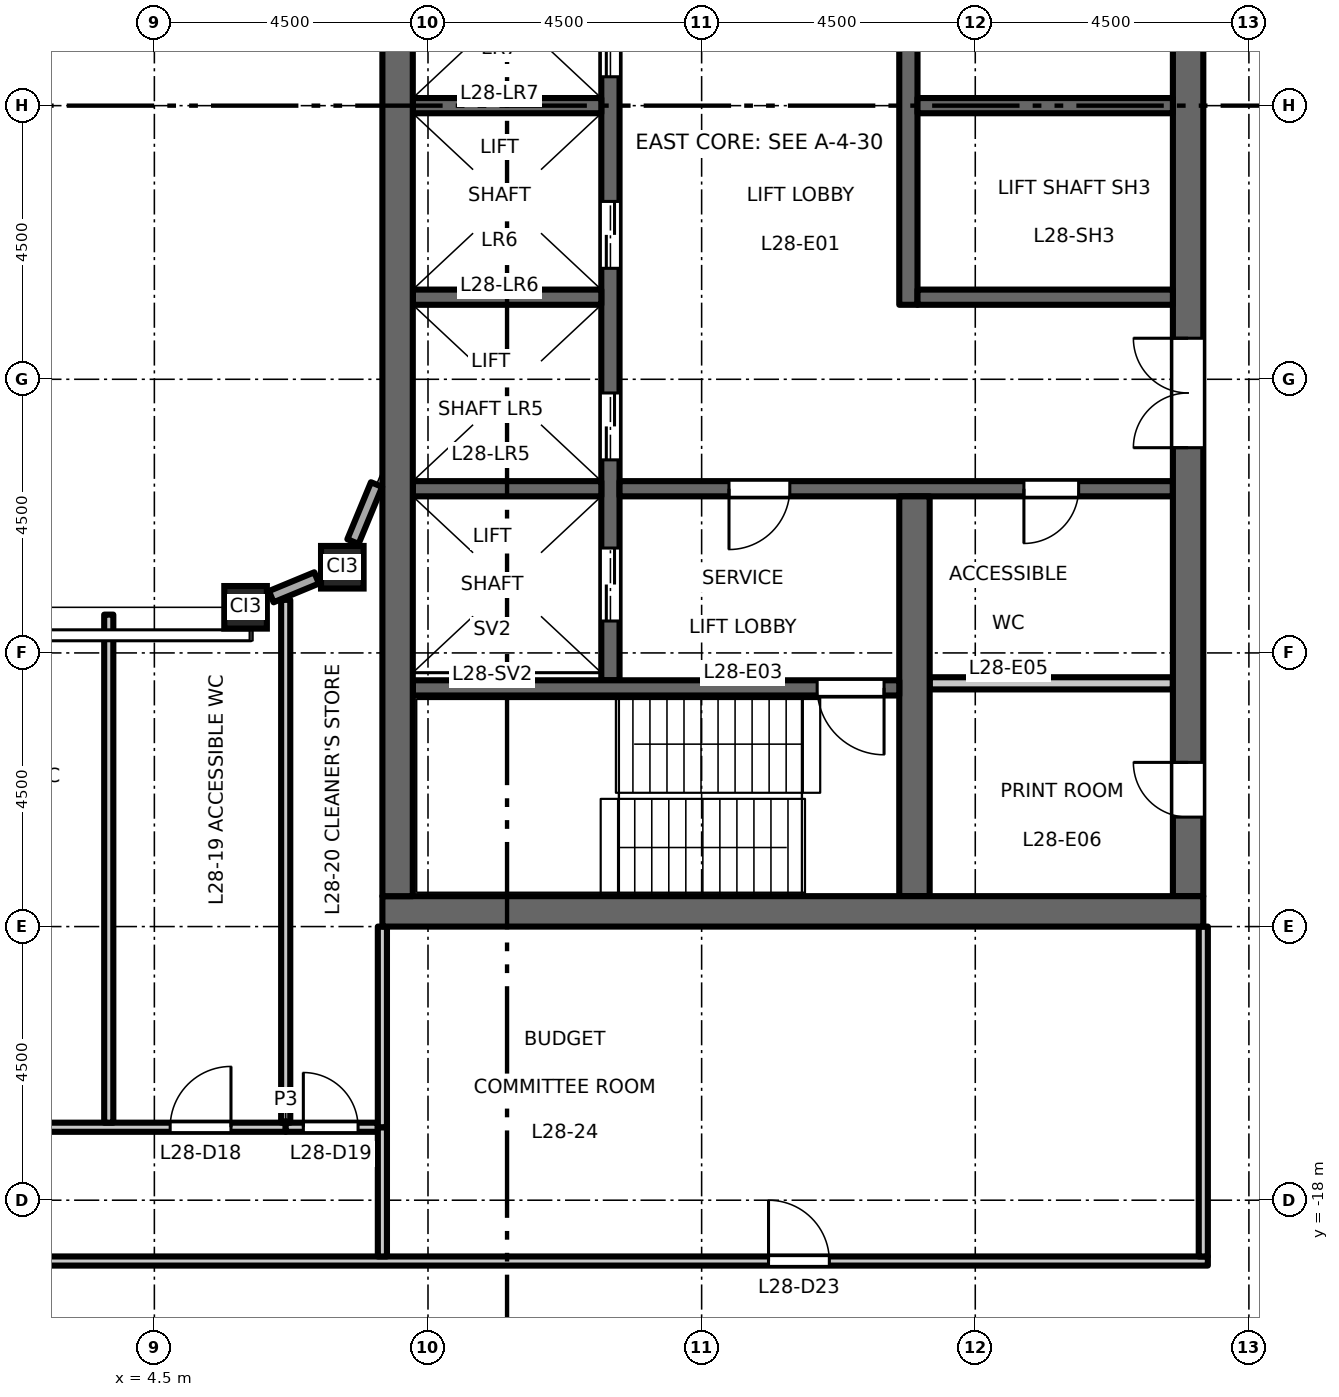
"""IFC4 building model, lengths in metres.
Left out: names, types, materials, properties, quantities, classifications, styles, units other than length and angle.
Written with IfcOpenShell. Run it as: python <this file> out.ifc"""

import sys

from ifc_helpers import new_model, si_unit, direction, frame, frame_2d, origin, origin_2d, place, context, subcontext, project, spatial, rectangle, hollow_rectangle, extrude, element, fill, save


model = new_model("IFC4")
c1 = context("Model", 3, precision=1e-05, world=origin(), true_north=direction((0.0, 1.0)))
c2 = subcontext(c1, "Body", "Model", "MODEL_VIEW")
j1 = project(units=[si_unit("LENGTHUNIT", "METRE"), si_unit("PLANEANGLEUNIT", "RADIAN")], contexts=[c1])
p1 = place(None, origin())
s1 = spatial("IfcSite", under=j1, at=p1, CompositionType="ELEMENT")
p2 = place(p1, origin())
s2 = spatial("IfcBuilding", under=s1, at=p2, CompositionType="ELEMENT")
p3 = place(p2, frame((0.0, 0.0, 131.7)))
s3 = spatial("IfcBuildingStorey", under=s2, at=p3, CompositionType="ELEMENT", Elevation=131.7)
for number, where, z_axis, x_axis in (
    (1, (6.0, -8.25, 0.0), (0.0, 0.0, 1.0), (1.0, 0.0, 0.0)),
    (2, (7.591, -7.591, 0.0), (0.0, 0.0, 1.0), (1.0, 0.0, 0.0)),
):
    element("IfcColumn", number, at=place(p3, frame(where, z_axis=z_axis, x_axis=x_axis)), inside=s3, PredefinedType="COLUMN", context=c2, shape_type="SweptSolid", body=[
        extrude(hollow_rectangle(XDim=0.7, YDim=0.7, WallThickness=0.04, at=origin_2d()), origin(), (0.0, 0.0, 1.0), 4.5),
    ])
p4 = place(p3, frame((12.0, -9.45, 0.0), z_axis=(0.0, 0.0, 1.0), x_axis=(0.0, 1.0, 0.0)))
e3 = element("IfcWall", 3, at=p4, inside=s3, PredefinedType="SHEAR", context=c2, shape_type="SweptSolid", body=[
    extrude(rectangle(XDim=18.9, YDim=0.3, at=frame_2d((9.45, 0.0))), origin(), (0.0, 0.0, 1.0), 4.35),
])
p5 = place(p4, frame((3.625, 0.0, 0.0)))
e4 = element("IfcOpeningElement", 4, at=p5, cuts=e3, PredefinedType="OPENING", context=c2, shape_type="SweptSolid", body=[
    extrude(rectangle(XDim=1.1, YDim=2.1, at=frame_2d((0.55, 1.05))), frame((0.0, 0.16, 0.0), z_axis=(0.0, -1.0, 0.0), x_axis=(1.0, 0.0, 0.0)), (0.0, 0.0, 1.0), 0.32),
])
p6 = place(p4, frame((6.775, 0.0, 0.0)))
e5 = element("IfcOpeningElement", 5, at=p6, cuts=e3, PredefinedType="OPENING", context=c2, shape_type="SweptSolid", body=[
    extrude(rectangle(XDim=1.1, YDim=2.1, at=frame_2d((0.55, 1.05))), frame((0.0, 0.16, 0.0), z_axis=(0.0, -1.0, 0.0), x_axis=(1.0, 0.0, 0.0)), (0.0, 0.0, 1.0), 0.32),
])
p7 = place(p4, frame((9.925, 0.0, 0.0)))
e6 = element("IfcOpeningElement", 6, at=p7, cuts=e3, PredefinedType="OPENING", context=c2, shape_type="SweptSolid", body=[
    extrude(rectangle(XDim=1.1, YDim=2.1, at=frame_2d((0.55, 1.05))), frame((0.0, 0.16, 0.0), z_axis=(0.0, -1.0, 0.0), x_axis=(1.0, 0.0, 0.0)), (0.0, 0.0, 1.0), 0.32),
])
p8 = place(p4, frame((13.075, 0.0, 0.0)))
e7 = element("IfcOpeningElement", 7, at=p8, cuts=e3, PredefinedType="OPENING", context=c2, shape_type="SweptSolid", body=[
    extrude(rectangle(XDim=1.1, YDim=2.1, at=frame_2d((0.55, 1.05))), frame((0.0, 0.16, 0.0), z_axis=(0.0, -1.0, 0.0), x_axis=(1.0, 0.0, 0.0)), (0.0, 0.0, 1.0), 0.32),
])
p9 = place(p4, frame((16.725, 0.0, 0.0)))
e8 = element("IfcOpeningElement", 8, at=p9, cuts=e3, PredefinedType="OPENING", context=c2, shape_type="SweptSolid", body=[
    extrude(rectangle(XDim=1.2, YDim=2.1, at=frame_2d((0.6, 1.05))), frame((0.0, 0.16, 0.0), z_axis=(0.0, -1.0, 0.0), x_axis=(1.0, 0.0, 0.0)), (0.0, 0.0, 1.0), 0.32),
])
p10 = place(p4, frame((0.975, 0.0, 0.0)))
e9 = element("IfcOpeningElement", 9, at=p10, cuts=e3, PredefinedType="OPENING", context=c2, shape_type="SweptSolid", body=[
    extrude(rectangle(XDim=1.2, YDim=2.1, at=frame_2d((0.6, 1.05))), frame((0.0, 0.16, 0.0), z_axis=(0.0, -1.0, 0.0), x_axis=(1.0, 0.0, 0.0)), (0.0, 0.0, 1.0), 0.32),
])
p11 = place(p3, frame((12.15, -6.3, 0.0), z_axis=(0.0, 0.0, 1.0), x_axis=(1.0, 0.0, 0.0)))
e10 = element("IfcWall", 10, at=p11, inside=s3, PredefinedType="SHEAR", context=c2, shape_type="SweptSolid", body=[
    extrude(rectangle(XDim=9.1, YDim=0.25, at=frame_2d((4.55, 0.0))), origin(), (0.0, 0.0, 1.0), 4.35),
])
p12 = place(p11, frame((1.8, 0.0, 0.0)))
e11 = element("IfcOpeningElement", 11, at=p12, cuts=e10, PredefinedType="OPENING", context=c2, shape_type="SweptSolid", body=[
    extrude(rectangle(XDim=1.0, YDim=2.1, at=frame_2d((0.5, 1.05))), frame((0.0, 0.135, 0.0), z_axis=(0.0, -1.0, 0.0), x_axis=(1.0, 0.0, 0.0)), (0.0, 0.0, 1.0), 0.27),
])
p13 = place(p11, frame((6.65, 0.0, 0.0)))
e12 = element("IfcOpeningElement", 12, at=p13, cuts=e10, PredefinedType="OPENING", context=c2, shape_type="SweptSolid", body=[
    extrude(rectangle(XDim=0.9, YDim=2.1, at=frame_2d((0.45, 1.05))), frame((0.0, 0.135, 0.0), z_axis=(0.0, -1.0, 0.0), x_axis=(1.0, 0.0, 0.0)), (0.0, 0.0, 1.0), 0.27),
])
p14 = place(p3, frame((21.5, -13.0, 0.0), z_axis=(0.0, 0.0, 1.0), x_axis=(0.0, 1.0, 0.0)))
e13 = element("IfcWall", 13, at=p14, inside=s3, PredefinedType="SHEAR", context=c2, shape_type="SweptSolid", body=[
    extrude(rectangle(XDim=26.0, YDim=0.5, at=frame_2d((13.0, 0.0))), origin(), (0.0, 0.0, 1.0), 4.35),
])
p15 = place(p14, frame((16.825, 0.0, 0.0)))
e14 = element("IfcOpeningElement", 14, at=p15, cuts=e13, PredefinedType="OPENING", context=c2, shape_type="SweptSolid", body=[
    extrude(rectangle(XDim=1.8, YDim=2.1, at=frame_2d((0.9, 1.05))), frame((0.0, 0.26, 0.0), z_axis=(0.0, -1.0, 0.0), x_axis=(1.0, 0.0, 0.0)), (0.0, 0.0, 1.0), 0.52),
])
p16 = place(p14, frame((7.375, 0.0, 0.0)))
e15 = element("IfcOpeningElement", 15, at=p16, cuts=e13, PredefinedType="OPENING", context=c2, shape_type="SweptSolid", body=[
    extrude(rectangle(XDim=1.8, YDim=2.1, at=frame_2d((0.9, 1.05))), frame((0.0, 0.26, 0.0), z_axis=(0.0, -1.0, 0.0), x_axis=(1.0, 0.0, 0.0)), (0.0, 0.0, 1.0), 0.52),
])
p17 = place(p14, frame((1.3, 0.0, 0.0)))
e16 = element("IfcOpeningElement", 16, at=p17, cuts=e13, PredefinedType="OPENING", context=c2, shape_type="SweptSolid", body=[
    extrude(rectangle(XDim=0.9, YDim=2.1, at=frame_2d((0.45, 1.05))), frame((0.0, 0.26, 0.0), z_axis=(0.0, -1.0, 0.0), x_axis=(1.0, 0.0, 0.0)), (0.0, 0.0, 1.0), 0.52),
])
p18 = place(p3, frame((17.25, -9.5, 0.0), z_axis=(0.0, 0.0, 1.0), x_axis=(1.0, 0.0, 0.0)))
e17 = element("IfcWall", 17, at=p18, inside=s3, PredefinedType="PARTITIONING", context=c2, shape_type="SweptSolid", body=[
    extrude(rectangle(XDim=4.0, YDim=0.2, at=frame_2d((2.0, 0.0))), origin(), (0.0, 0.0, 1.0), 4.35),
])
p19 = place(p3, frame((16.9, -3.275, 0.0), z_axis=(0.0, 0.0, 1.0), x_axis=(0.0, 1.0, 0.0)))
e18 = element("IfcWall", 18, at=p19, inside=s3, PredefinedType="SHEAR", context=c2, shape_type="SweptSolid", body=[
    extrude(rectangle(XDim=6.55, YDim=0.3, at=frame_2d((3.275, 0.0))), origin(), (0.0, 0.0, 1.0), 4.35),
])
for number, where, z_axis, x_axis in (
    (19, (17.05, 0.0, 0.0), (0.0, 0.0, 1.0), (1.0, 0.0, 0.0)),
    (20, (17.05, -3.15, 0.0), (0.0, 0.0, 1.0), (1.0, 0.0, 0.0)),
):
    element("IfcWall", number, at=place(p3, frame(where, z_axis=z_axis, x_axis=x_axis)), inside=s3, PredefinedType="SHEAR", context=c2, shape_type="SweptSolid", body=[
        extrude(rectangle(XDim=4.2, YDim=0.25, at=frame_2d((2.1, 0.0))), origin(), (0.0, 0.0, 1.0), 4.35),
    ])
p20 = place(p3, frame((17.0, -13.0, 0.0), z_axis=(0.0, 0.0, 1.0), x_axis=(0.0, 1.0, 0.0)))
e21 = element("IfcWall", 21, at=p20, inside=s3, PredefinedType="SHEAR", context=c2, shape_type="SweptSolid", body=[
    extrude(rectangle(XDim=6.575, YDim=0.5, at=frame_2d((3.288, 0.0))), origin(), (0.0, 0.0, 1.0), 4.35),
])
for number, where, z_axis, x_axis in (
    (22, (8.75, 0.0, 0.0), (0.0, 0.0, 1.0), (1.0, 0.0, 0.0)),
    (23, (8.75, -3.15, 0.0), (0.0, 0.0, 1.0), (1.0, 0.0, 0.0)),
    (24, (8.75, -6.3, 0.0), (0.0, 0.0, 1.0), (1.0, 0.0, 0.0)),
):
    element("IfcWall", number, at=place(p3, frame(where, z_axis=z_axis, x_axis=x_axis)), inside=s3, PredefinedType="SHEAR", context=c2, shape_type="SweptSolid", body=[
        extrude(rectangle(XDim=3.1, YDim=0.25, at=frame_2d((1.55, 0.0))), origin(), (0.0, 0.0, 1.0), 4.35),
    ])
p21 = place(p3, frame((8.75, -9.575, 0.0), z_axis=(0.0, 0.0, 1.0), x_axis=(1.0, 0.0, 0.0)))
e25 = element("IfcWall", 25, at=p21, inside=s3, PredefinedType="SHEAR", context=c2, shape_type="SweptSolid", body=[
    extrude(rectangle(XDim=8.0, YDim=0.25, at=frame_2d((4.0, 0.0))), origin(), (0.0, 0.0, 1.0), 4.35),
])
p22 = place(p21, frame((6.65, 0.0, 0.0)))
e26 = element("IfcOpeningElement", 26, at=p22, cuts=e25, PredefinedType="OPENING", context=c2, shape_type="SweptSolid", body=[
    extrude(rectangle(XDim=1.1, YDim=2.1, at=frame_2d((0.55, 1.05))), frame((0.0, 0.135, 0.0), z_axis=(0.0, -1.0, 0.0), x_axis=(1.0, 0.0, 0.0)), (0.0, 0.0, 1.0), 0.27),
])
p23 = place(p3, frame((8.25, -13.25, 0.0), z_axis=(0.0, 0.0, 1.0), x_axis=(1.0, 0.0, 0.0)))
e27 = element("IfcWall", 27, at=p23, inside=s3, PredefinedType="SHEAR", context=c2, shape_type="SweptSolid", body=[
    extrude(rectangle(XDim=13.5, YDim=0.5, at=frame_2d((6.75, 0.0))), origin(), (0.0, 0.0, 1.0), 4.35),
])
p24 = place(p3, frame((8.5, -13.0, 0.0), z_axis=(0.0, 0.0, 1.0), x_axis=(0.0, 1.0, 0.0)))
e28 = element("IfcWall", 28, at=p24, inside=s3, PredefinedType="SHEAR", context=c2, shape_type="SweptSolid", body=[
    extrude(rectangle(XDim=26.0, YDim=0.5, at=frame_2d((13.0, 0.0))), origin(), (0.0, 0.0, 1.0), 4.35),
])
p25 = place(p3, frame((6.423, -8.075, 0.0), z_axis=(0.0, 0.0, 1.0), x_axis=(0.923817771127, 0.382832503518, 0.0)))
e29 = element("IfcWall", 29, at=p25, inside=s3, PredefinedType="STANDARD", context=c2, shape_type="SweptSolid", body=[
    extrude(rectangle(XDim=0.807, YDim=0.2, at=frame_2d((0.404, 0.0))), origin(), (0.0, 0.0, 1.0), 3.826),
])
p26 = place(p3, frame((7.766, -7.168, 0.0), z_axis=(0.0, 0.0, 1.0), x_axis=(0.382769662028, 0.923843810301, 0.0)))
e30 = element("IfcWall", 30, at=p26, inside=s3, PredefinedType="STANDARD", context=c2, shape_type="SweptSolid", body=[
    extrude(rectangle(XDim=1.015, YDim=0.2, at=frame_2d((0.507, 0.0))), origin(), (0.0, 0.0, 1.0), 3.826),
])
p27 = place(p3, frame((-21.825, -19.0, 0.0), z_axis=(0.0, 0.0, 1.0), x_axis=(1.0, 0.0, 0.0)))
e31 = element("IfcWall", 31, at=p27, inside=s3, PredefinedType="PARTITIONING", context=c2, shape_type="SweptSolid", body=[
    extrude(rectangle(XDim=43.65, YDim=0.15, at=frame_2d((21.825, 0.0))), origin(), (0.0, 0.0, 1.0), 4.35),
])
p28 = place(p27, frame((21.425, 0.0, 0.0)))
e32 = element("IfcOpeningElement", 32, at=p28, cuts=e31, PredefinedType="OPENING", context=c2, shape_type="SweptSolid", body=[
    extrude(rectangle(XDim=1.0, YDim=2.1, at=frame_2d((0.5, 1.05))), frame((0.0, 0.085, 0.0), z_axis=(0.0, -1.0, 0.0), x_axis=(1.0, 0.0, 0.0)), (0.0, 0.0, 1.0), 0.17),
])
p29 = place(p27, frame((6.425, 0.0, 0.0)))
e33 = element("IfcOpeningElement", 33, at=p29, cuts=e31, PredefinedType="OPENING", context=c2, shape_type="SweptSolid", body=[
    extrude(rectangle(XDim=1.0, YDim=2.1, at=frame_2d((0.5, 1.05))), frame((0.0, 0.085, 0.0), z_axis=(0.0, -1.0, 0.0), x_axis=(1.0, 0.0, 0.0)), (0.0, 0.0, 1.0), 0.17),
])
p30 = place(p27, frame((36.425, 0.0, 0.0)))
e34 = element("IfcOpeningElement", 34, at=p30, cuts=e31, PredefinedType="OPENING", context=c2, shape_type="SweptSolid", body=[
    extrude(rectangle(XDim=1.0, YDim=2.1, at=frame_2d((0.5, 1.05))), frame((0.0, 0.085, 0.0), z_axis=(0.0, -1.0, 0.0), x_axis=(1.0, 0.0, 0.0)), (0.0, 0.0, 1.0), 0.17),
])
p31 = place(p3, frame((-8.175, -16.8, 0.0), z_axis=(0.0, 0.0, 1.0), x_axis=(1.0, 0.0, 0.0)))
e35 = element("IfcWall", 35, at=p31, inside=s3, PredefinedType="PARTITIONING", context=c2, shape_type="SweptSolid", body=[
    extrude(rectangle(XDim=14.835, YDim=0.15, at=frame_2d((7.417, 0.0))), origin(), (0.0, 0.0, 1.0), 4.35),
])
p32 = place(p31, frame((2.525, 0.0, 0.0)))
e36 = element("IfcOpeningElement", 36, at=p32, cuts=e35, PredefinedType="OPENING", context=c2, shape_type="SweptSolid", body=[
    extrude(rectangle(XDim=1.0, YDim=2.1, at=frame_2d((0.5, 1.05))), frame((0.0, 0.085, 0.0), z_axis=(0.0, -1.0, 0.0), x_axis=(1.0, 0.0, 0.0)), (0.0, 0.0, 1.0), 0.17),
])
p33 = place(p31, frame((8.775, 0.0, 0.0)))
e37 = element("IfcOpeningElement", 37, at=p33, cuts=e35, PredefinedType="OPENING", context=c2, shape_type="SweptSolid", body=[
    extrude(rectangle(XDim=1.0, YDim=2.1, at=frame_2d((0.5, 1.05))), frame((0.0, 0.085, 0.0), z_axis=(0.0, -1.0, 0.0), x_axis=(1.0, 0.0, 0.0)), (0.0, 0.0, 1.0), 0.17),
])
p34 = place(p31, frame((12.935, 0.0, 0.0)))
e38 = element("IfcOpeningElement", 38, at=p34, cuts=e35, PredefinedType="OPENING", context=c2, shape_type="SweptSolid", body=[
    extrude(rectangle(XDim=1.0, YDim=2.1, at=frame_2d((0.5, 1.05))), frame((0.0, 0.085, 0.0), z_axis=(0.0, -1.0, 0.0), x_axis=(1.0, 0.0, 0.0)), (0.0, 0.0, 1.0), 0.17),
])
p35 = place(p3, frame((6.66, -16.8, 0.0), z_axis=(0.0, 0.0, 1.0), x_axis=(1.0, 0.0, 0.0)))
e39 = element("IfcWall", 39, at=p35, inside=s3, PredefinedType="PARTITIONING", context=c2, shape_type="SweptSolid", body=[
    extrude(rectangle(XDim=1.515, YDim=0.15, at=frame_2d((0.758, 0.0))), origin(), (0.0, 0.0, 1.0), 4.35),
])
p36 = place(p35, frame((0.29, 0.0, 0.0)))
e40 = element("IfcOpeningElement", 40, at=p36, cuts=e39, PredefinedType="OPENING", context=c2, shape_type="SweptSolid", body=[
    extrude(rectangle(XDim=0.9, YDim=2.1, at=frame_2d((0.45, 1.05))), frame((0.0, 0.085, 0.0), z_axis=(0.0, -1.0, 0.0), x_axis=(1.0, 0.0, 0.0)), (0.0, 0.0, 1.0), 0.17),
])
p37 = place(p3, frame((3.75, -16.725, 0.0), z_axis=(0.0, 0.0, 1.0), x_axis=(0.0, 1.0, 0.0)))
e41 = element("IfcWall", 41, at=p37, inside=s3, PredefinedType="PARTITIONING", context=c2, shape_type="SweptSolid", body=[
    extrude(rectangle(XDim=8.355, YDim=0.15, at=frame_2d((4.177, 0.0))), origin(), (0.0, 0.0, 1.0), 4.35),
])
p38 = place(p3, frame((6.66, -16.725, 0.0), z_axis=(0.0, 0.0, 1.0), x_axis=(0.0, 1.0, 0.0)))
e42 = element("IfcWall", 42, at=p38, inside=s3, PredefinedType="PARTITIONING", context=c2, shape_type="SweptSolid", body=[
    extrude(rectangle(XDim=8.598, YDim=0.15, at=frame_2d((4.299, 0.0))), origin(), (0.0, 0.0, 1.0), 4.35),
])
p39 = place(p3, frame((8.25, -18.925, 0.0), z_axis=(0.0, 0.0, 1.0), x_axis=(0.0, 1.0, 0.0)))
e43 = element("IfcWall", 43, at=p39, inside=s3, PredefinedType="PARTITIONING", context=c2, shape_type="SweptSolid", body=[
    extrude(rectangle(XDim=2.125, YDim=0.15, at=frame_2d((1.062, 0.0))), origin(), (0.0, 0.0, 1.0), 4.35),
])
p40 = place(p3, frame((8.25, -16.8, 0.0), z_axis=(0.0, 0.0, 1.0), x_axis=(0.0, 1.0, 0.0)))
e44 = element("IfcWall", 44, at=p40, inside=s3, PredefinedType="PARTITIONING", context=c2, shape_type="SweptSolid", body=[
    extrude(rectangle(XDim=3.3, YDim=0.15, at=frame_2d((1.65, 0.0))), origin(), (0.0, 0.0, 1.0), 4.35),
])
p41 = place(p3, frame((21.75, -18.925, 0.0), z_axis=(0.0, 0.0, 1.0), x_axis=(0.0, 1.0, 0.0)))
e45 = element("IfcWall", 45, at=p41, inside=s3, PredefinedType="PARTITIONING", context=c2, shape_type="SweptSolid", body=[
    extrude(rectangle(XDim=5.425, YDim=0.15, at=frame_2d((2.712, 0.0))), origin(), (0.0, 0.0, 1.0), 4.35),
])
p42 = place(p12, origin())
e46 = element("IfcDoor", 46, at=p42, inside=s3, OperationType="SINGLE_SWING_LEFT", PredefinedType="DOOR", context=c2, shape_type="SweptSolid", body=[
    extrude(rectangle(XDim=1.0, YDim=2.1, at=frame_2d((0.5, 1.05))), frame((0.0, 0.025, 0.0), z_axis=(0.0, -1.0, 0.0), x_axis=(1.0, 0.0, 0.0)), (0.0, 0.0, 1.0), 0.05),
])
fill(e11, e46)
p43 = place(p22, origin())
e47 = element("IfcDoor", 47, at=p43, inside=s3, OperationType="SINGLE_SWING_RIGHT", PredefinedType="DOOR", context=c2, shape_type="SweptSolid", body=[
    extrude(rectangle(XDim=1.1, YDim=2.1, at=frame_2d((0.55, 1.05))), frame((0.0, 0.025, 0.0), z_axis=(0.0, -1.0, 0.0), x_axis=(1.0, 0.0, 0.0)), (0.0, 0.0, 1.0), 0.05),
])
fill(e26, e47)
p44 = place(p16, origin())
e48 = element("IfcDoor", 48, at=p44, inside=s3, OperationType="DOUBLE_DOOR_DOUBLE_SWING", PredefinedType="DOOR", context=c2, shape_type="SweptSolid", body=[
    extrude(rectangle(XDim=1.8, YDim=2.1, at=frame_2d((0.9, 1.05))), frame((0.0, 0.025, 0.0), z_axis=(0.0, -1.0, 0.0), x_axis=(1.0, 0.0, 0.0)), (0.0, 0.0, 1.0), 0.05),
])
fill(e15, e48)
p45 = place(p5, origin())
e49 = element("IfcDoor", 49, at=p45, inside=s3, OperationType="DOUBLE_DOOR_SLIDING", PredefinedType="DOOR", context=c2, shape_type="SweptSolid", body=[
    extrude(rectangle(XDim=1.1, YDim=2.1, at=frame_2d((0.55, 1.05))), frame((0.0, 0.025, 0.0), z_axis=(0.0, -1.0, 0.0), x_axis=(1.0, 0.0, 0.0)), (0.0, 0.0, 1.0), 0.05),
])
fill(e4, e49)
p46 = place(p6, origin())
e50 = element("IfcDoor", 50, at=p46, inside=s3, OperationType="DOUBLE_DOOR_SLIDING", PredefinedType="DOOR", context=c2, shape_type="SweptSolid", body=[
    extrude(rectangle(XDim=1.1, YDim=2.1, at=frame_2d((0.55, 1.05))), frame((0.0, 0.025, 0.0), z_axis=(0.0, -1.0, 0.0), x_axis=(1.0, 0.0, 0.0)), (0.0, 0.0, 1.0), 0.05),
])
fill(e5, e50)
p47 = place(p7, origin())
e51 = element("IfcDoor", 51, at=p47, inside=s3, OperationType="DOUBLE_DOOR_SLIDING", PredefinedType="DOOR", context=c2, shape_type="SweptSolid", body=[
    extrude(rectangle(XDim=1.1, YDim=2.1, at=frame_2d((0.55, 1.05))), frame((0.0, 0.025, 0.0), z_axis=(0.0, -1.0, 0.0), x_axis=(1.0, 0.0, 0.0)), (0.0, 0.0, 1.0), 0.05),
])
fill(e6, e51)
p48 = place(p10, origin())
e52 = element("IfcDoor", 52, at=p48, inside=s3, OperationType="DOUBLE_DOOR_SLIDING", PredefinedType="DOOR", context=c2, shape_type="SweptSolid", body=[
    extrude(rectangle(XDim=1.2, YDim=2.1, at=frame_2d((0.6, 1.05))), frame((0.0, 0.025, 0.0), z_axis=(0.0, -1.0, 0.0), x_axis=(1.0, 0.0, 0.0)), (0.0, 0.0, 1.0), 0.05),
])
fill(e9, e52)
p49 = place(p13, origin())
e53 = element("IfcDoor", 53, at=p49, inside=s3, OperationType="SINGLE_SWING_LEFT", PredefinedType="DOOR", context=c2, shape_type="SweptSolid", body=[
    extrude(rectangle(XDim=0.9, YDim=2.1, at=frame_2d((0.45, 1.05))), frame((0.0, 0.025, 0.0), z_axis=(0.0, -1.0, 0.0), x_axis=(1.0, 0.0, 0.0)), (0.0, 0.0, 1.0), 0.05),
])
fill(e12, e53)
p50 = place(p17, origin())
e54 = element("IfcDoor", 54, at=p50, inside=s3, OperationType="SINGLE_SWING_LEFT", PredefinedType="DOOR", context=c2, shape_type="SweptSolid", body=[
    extrude(rectangle(XDim=0.9, YDim=2.1, at=frame_2d((0.45, 1.05))), frame((0.0, 0.025, 0.0), z_axis=(0.0, -1.0, 0.0), x_axis=(1.0, 0.0, 0.0)), (0.0, 0.0, 1.0), 0.05),
])
fill(e16, e54)
p51 = place(p34, origin())
e55 = element("IfcDoor", 55, at=p51, inside=s3, OperationType="SINGLE_SWING_RIGHT", PredefinedType="DOOR", context=c2, shape_type="SweptSolid", body=[
    extrude(rectangle(XDim=1.0, YDim=2.1, at=frame_2d((0.5, 1.05))), frame((0.0, 0.025, 0.0), z_axis=(0.0, -1.0, 0.0), x_axis=(1.0, 0.0, 0.0)), (0.0, 0.0, 1.0), 0.05),
])
fill(e38, e55)
p52 = place(p36, origin())
e56 = element("IfcDoor", 56, at=p52, inside=s3, OperationType="SINGLE_SWING_LEFT", PredefinedType="DOOR", context=c2, shape_type="SweptSolid", body=[
    extrude(rectangle(XDim=0.9, YDim=2.1, at=frame_2d((0.45, 1.05))), frame((0.0, 0.025, 0.0), z_axis=(0.0, -1.0, 0.0), x_axis=(1.0, 0.0, 0.0)), (0.0, 0.0, 1.0), 0.05),
])
fill(e40, e56)
p53 = place(p30, origin())
e57 = element("IfcDoor", 57, at=p53, inside=s3, OperationType="SINGLE_SWING_LEFT", PredefinedType="DOOR", context=c2, shape_type="SweptSolid", body=[
    extrude(rectangle(XDim=1.0, YDim=2.1, at=frame_2d((0.5, 1.05))), frame((0.0, 0.025, 0.0), z_axis=(0.0, -1.0, 0.0), x_axis=(1.0, 0.0, 0.0)), (0.0, 0.0, 1.0), 0.05),
])
fill(e34, e57)
save(model, sys.argv[1])
